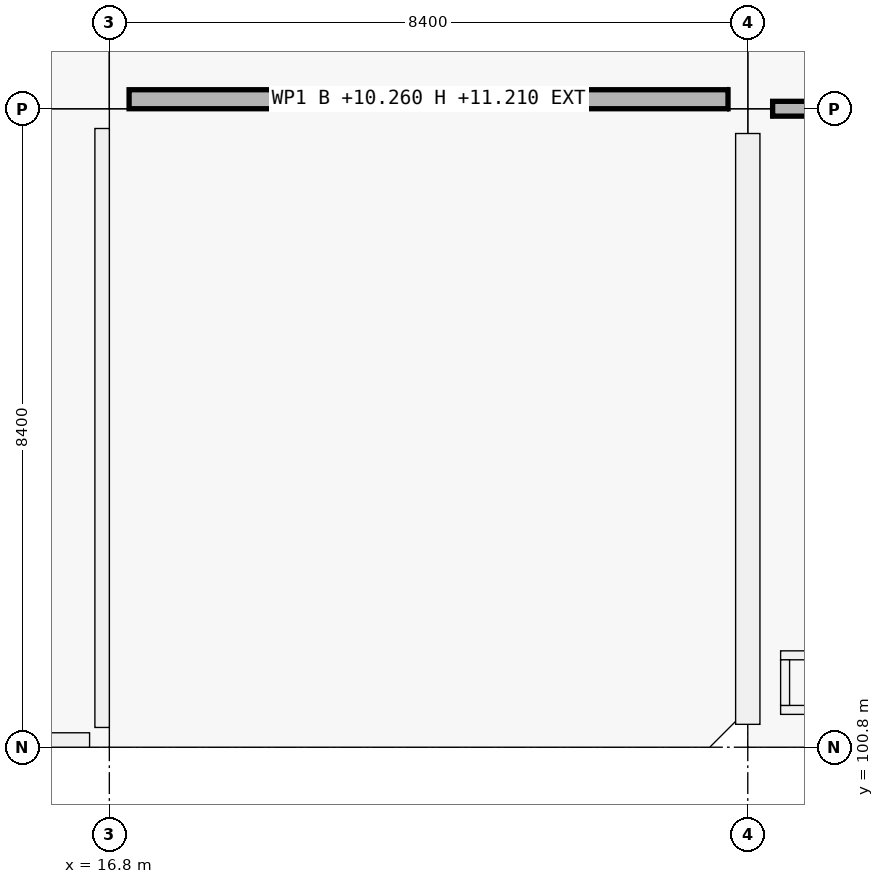
"""IFC4 building model, lengths in metres.
Left out: names, types, materials, properties, quantities, classifications, styles, units other than length and angle.
Written with IfcOpenShell. Run it as: python <this file> out.ifc"""

import sys

from ifc_helpers import new_model, si_unit, direction, frame, frame_2d, origin, origin_2d, place, context, subcontext, project, spatial, rectangle, extrude, element, fill, save


model = new_model("IFC4")
c1 = context("Model", 3, precision=1e-05, world=origin(), true_north=direction((0.0, 1.0)))
c2 = subcontext(c1, "Body", "Model", "MODEL_VIEW")
j1 = project(units=[si_unit("LENGTHUNIT", "METRE"), si_unit("PLANEANGLEUNIT", "RADIAN")], contexts=[c1])
p1 = place(None, origin())
s1 = spatial("IfcSite", under=j1, at=p1, CompositionType="ELEMENT")
p2 = place(p1, origin())
s2 = spatial("IfcBuilding", under=s1, at=p2, CompositionType="ELEMENT")
p3 = place(p2, frame((0.0, 0.0, 10.26)))
s3 = spatial("IfcBuildingStorey", under=s2, at=p3, CompositionType="ELEMENT", Elevation=10.26)
p4 = place(p3, frame((25.2, 100.8, 0.0), z_axis=(0.0, 0.0, 1.0), x_axis=(1.0, 0.0, 0.0)))
e1 = element("IfcColumn", 1, at=p4, inside=s3, PredefinedType="COLUMN", context=c2, shape_type="SweptSolid", body=[
    extrude(rectangle(XDim=0.6, YDim=0.6, at=origin_2d()), origin(), (0.0, 0.0, 1.0), 4.5),
])
p5 = place(p3, frame((25.2, 109.2, 0.0), z_axis=(0.0, 0.0, 1.0), x_axis=(1.0, 0.0, 0.0)))
e2 = element("IfcColumn", 2, at=p5, inside=s3, PredefinedType="COLUMN", context=c2, shape_type="SweptSolid", body=[
    extrude(rectangle(XDim=0.65, YDim=0.65, at=origin_2d()), origin(), (0.0, 0.0, 1.0), 4.5),
])
p6 = place(p3, frame((25.2, 101.101, 0.0), z_axis=(0.0, 0.0, 1.0), x_axis=(0.0, 1.0, 0.0)))
e3 = element("IfcWall", 3, at=p6, inside=s3, PredefinedType="SOLIDWALL", context=c2, shape_type="SweptSolid", body=[
    extrude(rectangle(XDim=7.773, YDim=0.32, at=frame_2d((3.886, 0.0))), origin(), (0.0, 0.0, 1.0), 3.54),
])
p7 = place(p6, frame((3.326, 0.0, 0.0)))
e4 = element("IfcOpeningElement", 4, at=p7, cuts=e3, PredefinedType="OPENING", context=c2, shape_type="SweptSolid", body=[
    extrude(rectangle(XDim=1.12, YDim=2.2, at=frame_2d((0.56, 1.1))), frame((0.0, 0.16, 0.0), z_axis=(0.0, -1.0, 0.0), x_axis=(1.0, 0.0, 0.0)), (0.0, 0.0, 1.0), 0.32),
])
p8 = place(p3, frame((16.54, 100.895, 0.0), z_axis=(0.0, 0.0, 1.0), x_axis=(-1.0, 0.0, 0.0)))
e5 = element("IfcWall", 5, at=p8, inside=s3, PredefinedType="PARAPET", context=c2, shape_type="SweptSolid", body=[
    extrude(rectangle(XDim=7.88, YDim=0.19, at=frame_2d((3.94, 0.0))), origin(), (0.0, 0.0, 1.0), 0.95),
])
p9 = place(p3, frame((16.705, 108.94, 0.0), z_axis=(0.0, 0.0, 1.0), x_axis=(0.0, -1.0, 0.0)))
e6 = element("IfcWall", 6, at=p9, inside=s3, PredefinedType="PARAPET", context=c2, shape_type="SweptSolid", body=[
    extrude(rectangle(XDim=7.88, YDim=0.19, at=frame_2d((3.94, 0.0))), origin(), (0.0, 0.0, 1.0), 0.95),
])
p10 = place(p3, frame((24.94, 109.325, 0.0), z_axis=(0.0, 0.0, 1.0), x_axis=(-1.0, 0.0, 0.0)))
e7 = element("IfcWall", 7, at=p10, inside=s3, PredefinedType="PARAPET", context=c2, shape_type="SweptSolid", body=[
    extrude(rectangle(XDim=7.88, YDim=0.25, at=frame_2d((3.94, 0.0))), origin(), (0.0, 0.0, 1.0), 0.95),
])
for number, where, z_axis, x_axis in (
    (8, (25.632, 101.291, 0.0), (0.0, 0.0, 1.0), (1.0, 0.0, 0.0)),
    (9, (25.632, 102.009, 0.0), (0.0, 0.0, 1.0), (1.0, 0.0, 0.0)),
):
    element("IfcWall", number, at=place(p3, frame(where, z_axis=z_axis, x_axis=x_axis)), inside=s3, PredefinedType="PARTITIONING", context=c2, shape_type="SweptSolid", body=[
        extrude(rectangle(XDim=1.036, YDim=0.118, at=frame_2d((0.518, 0.0))), origin(), (0.0, 0.0, 1.0), 3.53),
    ])
p11 = place(p3, frame((25.691, 101.35, 0.0), z_axis=(0.0, 0.0, 1.0), x_axis=(0.0, 1.0, 0.0)))
e10 = element("IfcWall", 10, at=p11, inside=s3, PredefinedType="PARTITIONING", context=c2, shape_type="SweptSolid", body=[
    extrude(rectangle(XDim=0.6, YDim=0.118, at=frame_2d((0.3, 0.0))), origin(), (0.0, 0.0, 1.0), 3.53),
])
p12 = place(p3, frame((25.527, 109.2, 0.0), z_axis=(0.0, 0.0, 1.0), x_axis=(1.0, 0.0, 0.0)))
e11 = element("IfcWall", 11, at=p12, inside=s3, PredefinedType="PARTITIONING", context=c2, shape_type="SweptSolid", body=[
    extrude(rectangle(XDim=7.771, YDim=0.195, at=frame_2d((3.885, 0.0))), origin(), (0.0, 0.0, 1.0), 3.37),
])
p13 = place(p12, frame((3.375, 0.0, 0.0)))
e12 = element("IfcOpeningElement", 12, at=p13, cuts=e11, PredefinedType="OPENING", context=c2, shape_type="SweptSolid", body=[
    extrude(rectangle(XDim=1.02, YDim=2.2, at=frame_2d((0.51, 1.1))), frame((0.0, 0.098, 0.0), z_axis=(0.0, -1.0, 0.0), x_axis=(1.0, 0.0, 0.0)), (0.0, 0.0, 1.0), 0.195),
])
p14 = place(p7, origin())
e13 = element("IfcDoor", 13, at=p14, inside=s3, OperationType="SINGLE_SWING_RIGHT", PredefinedType="DOOR", context=c2, shape_type="SweptSolid", body=[
    extrude(rectangle(XDim=1.12, YDim=2.2, at=frame_2d((0.56, 1.1))), frame((0.0, 0.025, 0.0), z_axis=(0.0, -1.0, 0.0), x_axis=(1.0, 0.0, 0.0)), (0.0, 0.0, 1.0), 0.05),
])
fill(e4, e13)
save(model, sys.argv[1])
